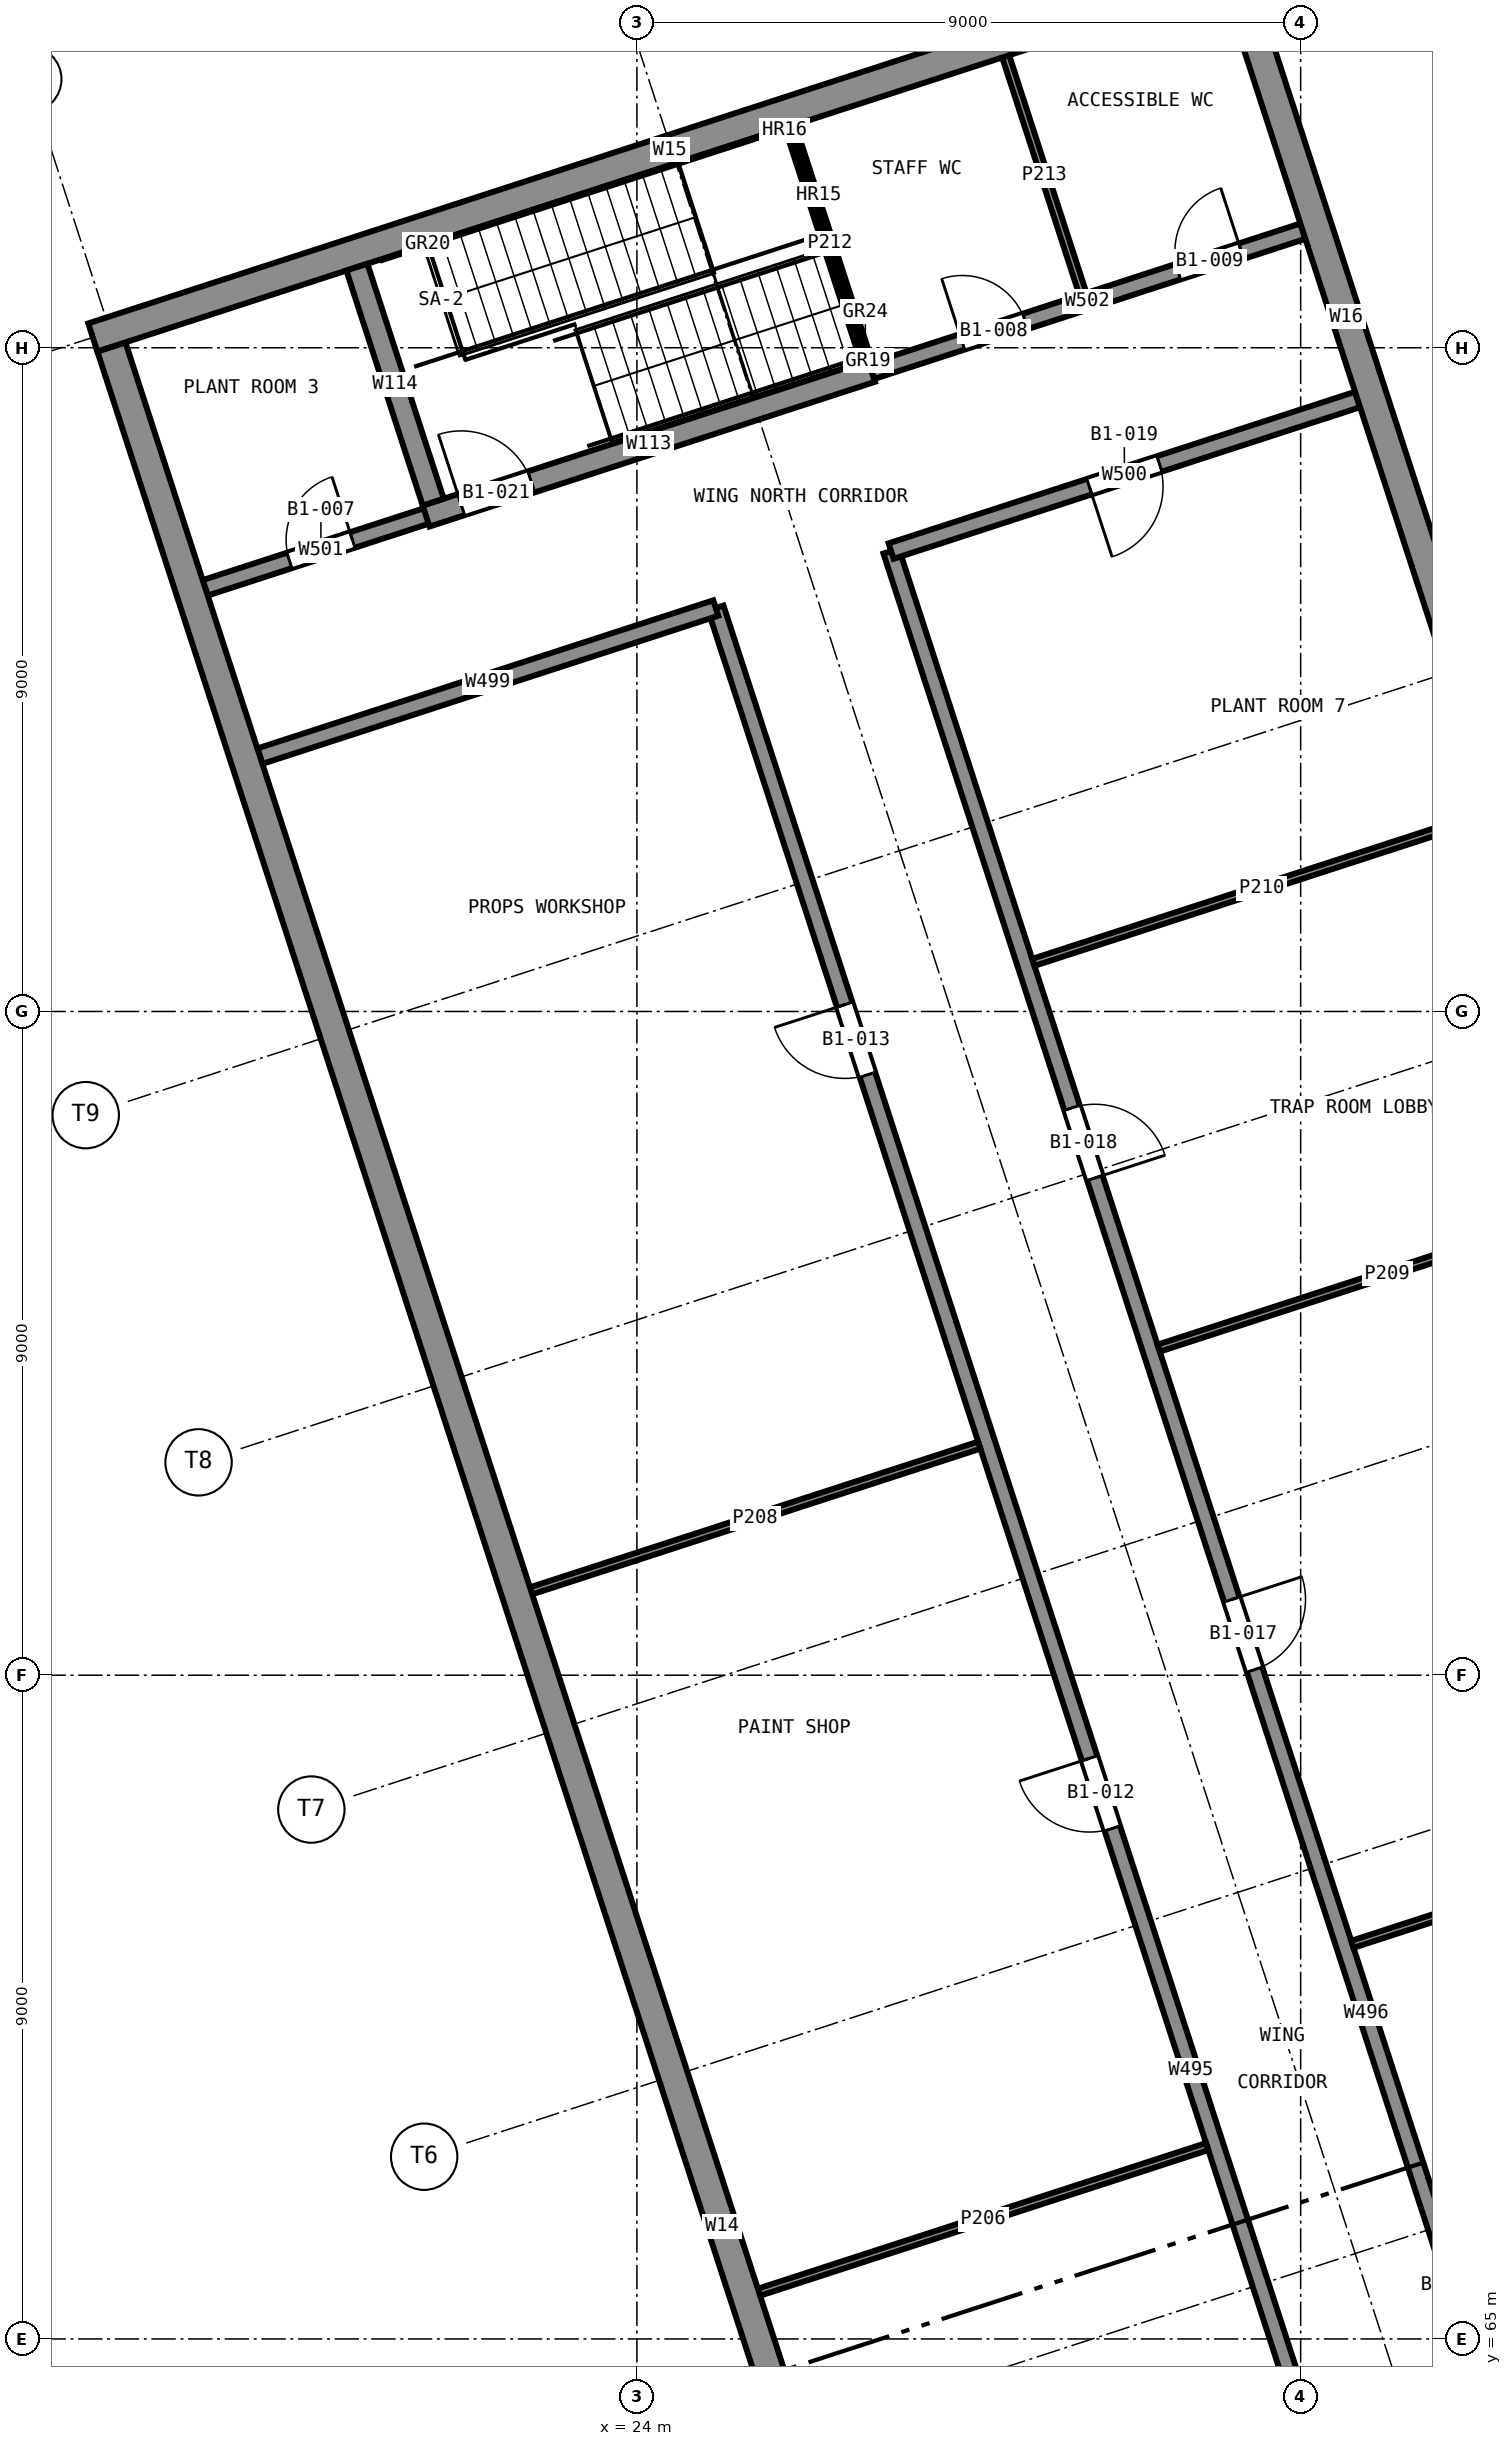
"""IFC4 building model, lengths in metres.
Left out: names, types, materials, properties, quantities, classifications, styles, units other than length and angle.
Written with IfcOpenShell. Run it as: python <this file> out.ifc"""

import sys

from ifc_helpers import new_model, si_unit, direction, frame, frame_2d, origin, place, context, subcontext, project, spatial, rectangle, extrude, element, fill, save


model = new_model("IFC4")
c1 = context("Model", 3, precision=1e-05, world=origin(), true_north=direction((0.0, 1.0)))
c2 = subcontext(c1, "Body", "Model", "MODEL_VIEW")
j1 = project(units=[si_unit("LENGTHUNIT", "METRE"), si_unit("PLANEANGLEUNIT", "RADIAN")], contexts=[c1])
p1 = place(None, origin())
s1 = spatial("IfcSite", under=j1, at=p1, CompositionType="ELEMENT")
p2 = place(p1, origin())
s2 = spatial("IfcBuilding", under=s1, at=p2, CompositionType="ELEMENT")
p3 = place(p2, frame((0.0, 0.0, -5.0)))
s3 = spatial("IfcBuildingStorey", under=s2, at=p3, CompositionType="ELEMENT", Elevation=-5.0)
p4 = place(p3, frame((33.438, 41.035, 0.0), z_axis=(0.0, 0.0, 1.0), x_axis=(-0.309020156104, 0.951055488981, 0.0)))
e1 = element("IfcWall", 1, at=p4, inside=s3, PredefinedType="SOLIDWALL", context=c2, shape_type="SweptSolid", body=[
    extrude(rectangle(XDim=53.6, YDim=0.4, at=frame_2d((26.8, 0.0))), origin(), (0.0, 0.0, 1.0), 5.0),
])
p5 = place(p3, frame((16.622, 92.14, 0.0), z_axis=(0.0, 0.0, 1.0), x_axis=(0.951054352744, 0.30902365302, 0.0)))
e2 = element("IfcWall", 2, at=p5, inside=s3, PredefinedType="SOLIDWALL", context=c2, shape_type="SweptSolid", body=[
    extrude(rectangle(XDim=16.45, YDim=0.4, at=frame_2d((8.225, 0.0))), origin(), (0.0, 0.0, 1.0), 5.0),
])
p6 = place(p3, frame((32.139, 96.971, 0.0), z_axis=(0.0, 0.0, 1.0), x_axis=(0.30901284874, -0.951057863284, 0.0)))
e3 = element("IfcWall", 3, at=p6, inside=s3, PredefinedType="SOLIDWALL", context=c2, shape_type="SweptSolid", body=[
    extrude(rectangle(XDim=9.575, YDim=0.4, at=frame_2d((4.787, 0.0))), origin(), (0.0, 0.0, 1.0), 5.0),
])
p7 = place(p3, frame((27.181, 91.68, 0.0), z_axis=(0.0, 0.0, 1.0), x_axis=(-0.951051301895, -0.309033042189, 0.0)))
e4 = element("IfcWall", 4, at=p7, inside=s3, PredefinedType="SOLIDWALL", context=c2, shape_type="SweptSolid", body=[
    extrude(rectangle(XDim=6.35, YDim=0.3, at=frame_2d((3.175, 0.0))), origin(), (0.0, 0.0, 1.0), 4.6),
])
p8 = place(p7, frame((4.85, 0.0, 0.0)))
e5 = element("IfcOpeningElement", 5, at=p8, cuts=e4, PredefinedType="OPENING", context=c2, shape_type="SweptSolid", body=[
    extrude(rectangle(XDim=1.0, YDim=2.1, at=frame_2d((0.5, 1.05))), frame((0.0, 0.16, 0.0), z_axis=(0.0, -1.0, 0.0), x_axis=(1.0, 0.0, 0.0)), (0.0, 0.0, 1.0), 0.32),
])
p9 = place(p3, frame((21.238, 89.907, 0.0), z_axis=(0.0, 0.0, 1.0), x_axis=(-0.309003676349, 0.951060843481, 0.0)))
e6 = element("IfcWall", 6, at=p9, inside=s3, PredefinedType="SOLIDWALL", context=c2, shape_type="SweptSolid", body=[
    extrude(rectangle(XDim=3.35, YDim=0.3, at=frame_2d((1.675, 0.0))), origin(), (0.0, 0.0, 1.0), 4.6),
])
p10 = place(p3, frame((37.956, 48.812, 0.0), z_axis=(0.0, 0.0, 1.0), x_axis=(-0.30901736393, 0.951056396219, 0.0)))
e7 = element("IfcWall", 7, at=p10, inside=s3, PredefinedType="SOLIDWALL", context=c2, shape_type="SweptSolid", body=[
    extrude(rectangle(XDim=41.7, YDim=0.22, at=frame_2d((20.85, 0.0))), origin(), (0.0, 0.0, 1.0), 4.6),
])
p11 = place(p10, frame((2.009, 0.0, 0.0)))
e8 = element("IfcOpeningElement", 8, at=p11, cuts=e7, PredefinedType="OPENING", context=c2, shape_type="SweptSolid", body=[
    extrude(rectangle(XDim=1.0, YDim=2.1, at=frame_2d((0.5, 1.05))), frame((0.0, 0.12, 0.0), z_axis=(0.0, -1.0, 0.0), x_axis=(1.0, 0.0, 0.0)), (0.0, 0.0, 1.0), 0.24),
])
p12 = place(p10, frame((11.495, 0.0, 0.0)))
e9 = element("IfcOpeningElement", 9, at=p12, cuts=e7, PredefinedType="OPENING", context=c2, shape_type="SweptSolid", body=[
    extrude(rectangle(XDim=1.0, YDim=2.1, at=frame_2d((0.5, 1.05))), frame((0.0, 0.12, 0.0), z_axis=(0.0, -1.0, 0.0), x_axis=(1.0, 0.0, 0.0)), (0.0, 0.0, 1.0), 0.24),
])
p13 = place(p10, frame((24.3, 0.0, 0.0)))
e10 = element("IfcOpeningElement", 10, at=p13, cuts=e7, PredefinedType="OPENING", context=c2, shape_type="SweptSolid", body=[
    extrude(rectangle(XDim=1.0, YDim=2.1, at=frame_2d((0.5, 1.05))), frame((0.0, 0.12, 0.0), z_axis=(0.0, -1.0, 0.0), x_axis=(1.0, 0.0, 0.0)), (0.0, 0.0, 1.0), 0.24),
])
p14 = place(p10, frame((35.045, 0.0, 0.0)))
e11 = element("IfcOpeningElement", 11, at=p14, cuts=e7, PredefinedType="OPENING", context=c2, shape_type="SweptSolid", body=[
    extrude(rectangle(XDim=1.0, YDim=2.1, at=frame_2d((0.5, 1.05))), frame((0.0, 0.12, 0.0), z_axis=(0.0, -1.0, 0.0), x_axis=(1.0, 0.0, 0.0)), (0.0, 0.0, 1.0), 0.24),
])
p15 = place(p3, frame((40.333, 49.584, 0.0), z_axis=(0.0, 0.0, 1.0), x_axis=(-0.309015643281, 0.951056955291, 0.0)))
e12 = element("IfcWall", 12, at=p15, inside=s3, PredefinedType="SOLIDWALL", context=c2, shape_type="SweptSolid", body=[
    extrude(rectangle(XDim=41.7, YDim=0.22, at=frame_2d((20.85, 0.0))), origin(), (0.0, 0.0, 1.0), 4.6),
])
p16 = place(p15, frame((2.0, 0.0, 0.0)))
e13 = element("IfcOpeningElement", 13, at=p16, cuts=e12, PredefinedType="OPENING", context=c2, shape_type="SweptSolid", body=[
    extrude(rectangle(XDim=1.0, YDim=2.1, at=frame_2d((0.5, 1.05))), frame((0.0, 0.12, 0.0), z_axis=(0.0, -1.0, 0.0), x_axis=(1.0, 0.0, 0.0)), (0.0, 0.0, 1.0), 0.24),
])
p17 = place(p15, frame((8.285, 0.0, 0.0)))
e14 = element("IfcOpeningElement", 14, at=p17, cuts=e12, PredefinedType="OPENING", context=c2, shape_type="SweptSolid", body=[
    extrude(rectangle(XDim=1.0, YDim=2.1, at=frame_2d((0.5, 1.05))), frame((0.0, 0.12, 0.0), z_axis=(0.0, -1.0, 0.0), x_axis=(1.0, 0.0, 0.0)), (0.0, 0.0, 1.0), 0.24),
])
p18 = place(p15, frame((16.475, 0.0, 0.0)))
e15 = element("IfcOpeningElement", 15, at=p18, cuts=e12, PredefinedType="OPENING", context=c2, shape_type="SweptSolid", body=[
    extrude(rectangle(XDim=1.0, YDim=2.1, at=frame_2d((0.5, 1.05))), frame((0.0, 0.12, 0.0), z_axis=(0.0, -1.0, 0.0), x_axis=(1.0, 0.0, 0.0)), (0.0, 0.0, 1.0), 0.24),
])
p19 = place(p15, frame((25.752, 0.0, 0.0)))
e16 = element("IfcOpeningElement", 16, at=p19, cuts=e12, PredefinedType="OPENING", context=c2, shape_type="SweptSolid", body=[
    extrude(rectangle(XDim=1.0, YDim=2.1, at=frame_2d((0.5, 1.05))), frame((0.0, 0.12, 0.0), z_axis=(0.0, -1.0, 0.0), x_axis=(1.0, 0.0, 0.0)), (0.0, 0.0, 1.0), 0.24),
])
p20 = place(p15, frame((32.761, 0.0, 0.0)))
e17 = element("IfcOpeningElement", 17, at=p20, cuts=e12, PredefinedType="OPENING", context=c2, shape_type="SweptSolid", body=[
    extrude(rectangle(XDim=1.0, YDim=2.1, at=frame_2d((0.5, 1.05))), frame((0.0, 0.12, 0.0), z_axis=(0.0, -1.0, 0.0), x_axis=(1.0, 0.0, 0.0)), (0.0, 0.0, 1.0), 0.24),
])
p21 = place(p3, frame((18.888, 86.462, 0.0), z_axis=(0.0, 0.0, 1.0), x_axis=(0.951059735424, 0.30900708674, 0.0)))
e18 = element("IfcWall", 18, at=p21, inside=s3, PredefinedType="SOLIDWALL", context=c2, shape_type="SweptSolid", body=[
    extrude(rectangle(XDim=6.5, YDim=0.22, at=frame_2d((3.25, 0.0))), origin(), (0.0, 0.0, 1.0), 4.6),
])
p22 = place(p3, frame((27.447, 89.243, 0.0), z_axis=(0.0, 0.0, 1.0), x_axis=(0.95105699893, 0.309015508975, 0.0)))
e19 = element("IfcWall", 19, at=p22, inside=s3, PredefinedType="SOLIDWALL", context=c2, shape_type="SweptSolid", body=[
    extrude(rectangle(XDim=6.65, YDim=0.22, at=frame_2d((3.325, 0.0))), origin(), (0.0, 0.0, 1.0), 4.6),
])
p23 = place(p22, frame((2.825, 0.0, 0.0)))
e20 = element("IfcOpeningElement", 20, at=p23, cuts=e19, PredefinedType="OPENING", context=c2, shape_type="SweptSolid", body=[
    extrude(rectangle(XDim=1.0, YDim=2.1, at=frame_2d((0.5, 1.05))), frame((0.0, 0.12, 0.0), z_axis=(0.0, -1.0, 0.0), x_axis=(1.0, 0.0, 0.0)), (0.0, 0.0, 1.0), 0.24),
])
p24 = place(p3, frame((18.146, 88.744, 0.0), z_axis=(0.0, 0.0, 1.0), x_axis=(0.951053095941, 0.309027520945, 0.0)))
e21 = element("IfcWall", 21, at=p24, inside=s3, PredefinedType="SOLIDWALL", context=c2, shape_type="SweptSolid", body=[
    extrude(rectangle(XDim=3.3, YDim=0.22, at=frame_2d((1.65, 0.0))), origin(), (0.0, 0.0, 1.0), 4.6),
])
p25 = place(p24, frame((1.2, 0.0, 0.0)))
e22 = element("IfcOpeningElement", 22, at=p25, cuts=e21, PredefinedType="OPENING", context=c2, shape_type="SweptSolid", body=[
    extrude(rectangle(XDim=0.9, YDim=2.1, at=frame_2d((0.45, 1.05))), frame((0.0, 0.12, 0.0), z_axis=(0.0, -1.0, 0.0), x_axis=(1.0, 0.0, 0.0)), (0.0, 0.0, 1.0), 0.24),
])
p26 = place(p3, frame((27.181, 91.68, 0.0), z_axis=(0.0, 0.0, 1.0), x_axis=(0.951061487132, 0.309001695293, 0.0)))
e23 = element("IfcWall", 23, at=p26, inside=s3, PredefinedType="SOLIDWALL", context=c2, shape_type="SweptSolid", body=[
    extrude(rectangle(XDim=6.15, YDim=0.22, at=frame_2d((3.075, 0.0))), origin(), (0.0, 0.0, 1.0), 4.6),
])
p27 = place(p26, frame((1.293, 0.0, 0.0)))
e24 = element("IfcOpeningElement", 24, at=p27, cuts=e23, PredefinedType="OPENING", context=c2, shape_type="SweptSolid", body=[
    extrude(rectangle(XDim=0.9, YDim=2.1, at=frame_2d((0.45, 1.05))), frame((0.0, 0.12, 0.0), z_axis=(0.0, -1.0, 0.0), x_axis=(1.0, 0.0, 0.0)), (0.0, 0.0, 1.0), 0.24),
])
p28 = place(p26, frame((4.371, 0.0, 0.0)))
e25 = element("IfcOpeningElement", 25, at=p28, cuts=e23, PredefinedType="OPENING", context=c2, shape_type="SweptSolid", body=[
    extrude(rectangle(XDim=0.9, YDim=2.1, at=frame_2d((0.45, 1.05))), frame((0.0, 0.12, 0.0), z_axis=(0.0, -1.0, 0.0), x_axis=(1.0, 0.0, 0.0)), (0.0, 0.0, 1.0), 0.24),
])
p29 = place(p3, frame((25.655, 65.634, 0.0), z_axis=(0.0, 0.0, 1.0), x_axis=(0.951055405517, 0.309020412977, 0.0)))
e26 = element("IfcWall", 26, at=p29, inside=s3, PredefinedType="PARTITIONING", context=c2, shape_type="SweptSolid", body=[
    extrude(rectangle(XDim=6.39, YDim=0.1, at=frame_2d((3.195, 0.0))), origin(), (0.0, 0.0, 1.0), 4.6),
])
p30 = place(p3, frame((33.701, 70.351, 0.0), z_axis=(0.0, 0.0, 1.0), x_axis=(0.951058024796, 0.309012351648, 0.0)))
e27 = element("IfcWall", 27, at=p30, inside=s3, PredefinedType="PARTITIONING", context=c2, shape_type="SweptSolid", body=[
    extrude(rectangle(XDim=6.515, YDim=0.1, at=frame_2d((3.257, 0.0))), origin(), (0.0, 0.0, 1.0), 4.6),
])
p31 = place(p3, frame((22.565, 75.144, 0.0), z_axis=(0.0, 0.0, 1.0), x_axis=(0.951055405517, 0.309020412977, 0.0)))
e28 = element("IfcWall", 28, at=p31, inside=s3, PredefinedType="PARTITIONING", context=c2, shape_type="SweptSolid", body=[
    extrude(rectangle(XDim=6.39, YDim=0.1, at=frame_2d((3.195, 0.0))), origin(), (0.0, 0.0, 1.0), 4.6),
])
p32 = place(p3, frame((31.075, 78.435, 0.0), z_axis=(0.0, 0.0, 1.0), x_axis=(0.951058024796, 0.309012351648, 0.0)))
e29 = element("IfcWall", 29, at=p32, inside=s3, PredefinedType="PARTITIONING", context=c2, shape_type="SweptSolid", body=[
    extrude(rectangle(XDim=6.515, YDim=0.1, at=frame_2d((3.257, 0.0))), origin(), (0.0, 0.0, 1.0), 4.6),
])
p33 = place(p3, frame((29.375, 83.666, 0.0), z_axis=(0.0, 0.0, 1.0), x_axis=(0.951061602966, 0.309001338773, 0.0)))
e30 = element("IfcWall", 30, at=p33, inside=s3, PredefinedType="PARTITIONING", context=c2, shape_type="SweptSolid", body=[
    extrude(rectangle(XDim=6.515, YDim=0.1, at=frame_2d((3.258, 0.0))), origin(), (0.0, 0.0, 1.0), 4.6),
])
p34 = place(p3, frame((27.135, 91.823, 0.0), z_axis=(0.0, 0.0, 1.0), x_axis=(-0.309003676349, 0.951060843481, 0.0)))
e31 = element("IfcWall", 31, at=p34, inside=s3, PredefinedType="PARTITIONING", context=c2, shape_type="SweptSolid", body=[
    extrude(rectangle(XDim=3.35, YDim=0.1, at=frame_2d((1.675, 0.0))), origin(), (0.0, 0.0, 1.0), 4.6),
])
p35 = place(p3, frame((30.048, 92.727, 0.0), z_axis=(0.0, 0.0, 1.0), x_axis=(-0.309024191767, 0.951054177691, 0.0)))
e32 = element("IfcWall", 32, at=p35, inside=s3, PredefinedType="PARTITIONING", context=c2, shape_type="SweptSolid", body=[
    extrude(rectangle(XDim=3.39, YDim=0.1, at=frame_2d((1.695, 0.0))), origin(), (0.0, 0.0, 1.0), 4.6),
])
p36 = place(p25, origin())
e33 = element("IfcDoor", 33, at=p36, inside=s3, OperationType="SINGLE_SWING_LEFT", PredefinedType="DOOR", context=c2, shape_type="SweptSolid", body=[
    extrude(rectangle(XDim=0.9, YDim=2.1, at=frame_2d((0.45, 1.05))), frame((0.0, 0.025, 0.0), z_axis=(0.0, -1.0, 0.0), x_axis=(1.0, 0.0, 0.0)), (0.0, 0.0, 1.0), 0.05),
])
fill(e22, e33)
p37 = place(p27, origin())
e34 = element("IfcDoor", 34, at=p37, inside=s3, OperationType="SINGLE_SWING_RIGHT", PredefinedType="DOOR", context=c2, shape_type="SweptSolid", body=[
    extrude(rectangle(XDim=0.9, YDim=2.1, at=frame_2d((0.45, 1.05))), frame((0.0, 0.025, 0.0), z_axis=(0.0, -1.0, 0.0), x_axis=(1.0, 0.0, 0.0)), (0.0, 0.0, 1.0), 0.05),
])
fill(e24, e34)
p38 = place(p28, origin())
e35 = element("IfcDoor", 35, at=p38, inside=s3, OperationType="SINGLE_SWING_LEFT", PredefinedType="DOOR", context=c2, shape_type="SweptSolid", body=[
    extrude(rectangle(XDim=0.9, YDim=2.1, at=frame_2d((0.45, 1.05))), frame((0.0, 0.025, 0.0), z_axis=(0.0, -1.0, 0.0), x_axis=(1.0, 0.0, 0.0)), (0.0, 0.0, 1.0), 0.05),
])
fill(e25, e35)
p39 = place(p13, origin())
e36 = element("IfcDoor", 36, at=p39, inside=s3, OperationType="SINGLE_SWING_LEFT", PredefinedType="DOOR", context=c2, shape_type="SweptSolid", body=[
    extrude(rectangle(XDim=1.0, YDim=2.1, at=frame_2d((0.5, 1.05))), frame((0.0, 0.025, 0.0), z_axis=(0.0, -1.0, 0.0), x_axis=(1.0, 0.0, 0.0)), (0.0, 0.0, 1.0), 0.05),
])
fill(e10, e36)
p40 = place(p14, origin())
e37 = element("IfcDoor", 37, at=p40, inside=s3, OperationType="SINGLE_SWING_LEFT", PredefinedType="DOOR", context=c2, shape_type="SweptSolid", body=[
    extrude(rectangle(XDim=1.0, YDim=2.1, at=frame_2d((0.5, 1.05))), frame((0.0, 0.025, 0.0), z_axis=(0.0, -1.0, 0.0), x_axis=(1.0, 0.0, 0.0)), (0.0, 0.0, 1.0), 0.05),
])
fill(e11, e37)
p41 = place(p19, frame((1.0, 0.0, 0.0), z_axis=(0.0, 0.0, 1.0), x_axis=(-1.0, 0.0, 0.0)))
e38 = element("IfcDoor", 38, at=p41, inside=s3, OperationType="SINGLE_SWING_RIGHT", PredefinedType="DOOR", context=c2, shape_type="SweptSolid", body=[
    extrude(rectangle(XDim=1.0, YDim=2.1, at=frame_2d((0.5, 1.05))), frame((0.0, 0.025, 0.0), z_axis=(0.0, -1.0, 0.0), x_axis=(1.0, 0.0, 0.0)), (0.0, 0.0, 1.0), 0.05),
])
fill(e16, e38)
p42 = place(p20, frame((1.0, 0.0, 0.0), z_axis=(0.0, 0.0, 1.0), x_axis=(-1.0, 0.0, 0.0)))
e39 = element("IfcDoor", 39, at=p42, inside=s3, OperationType="SINGLE_SWING_LEFT", PredefinedType="DOOR", context=c2, shape_type="SweptSolid", body=[
    extrude(rectangle(XDim=1.0, YDim=2.1, at=frame_2d((0.5, 1.05))), frame((0.0, 0.025, 0.0), z_axis=(0.0, -1.0, 0.0), x_axis=(1.0, 0.0, 0.0)), (0.0, 0.0, 1.0), 0.05),
])
fill(e17, e39)
p43 = place(p23, frame((1.0, 0.0, 0.0), z_axis=(0.0, 0.0, 1.0), x_axis=(-1.0, 0.0, 0.0)))
e40 = element("IfcDoor", 40, at=p43, inside=s3, OperationType="SINGLE_SWING_LEFT", PredefinedType="DOOR", context=c2, shape_type="SweptSolid", body=[
    extrude(rectangle(XDim=1.0, YDim=2.1, at=frame_2d((0.5, 1.05))), frame((0.0, 0.025, 0.0), z_axis=(0.0, -1.0, 0.0), x_axis=(1.0, 0.0, 0.0)), (0.0, 0.0, 1.0), 0.05),
])
fill(e20, e40)
p44 = place(p8, frame((1.0, 0.0, 0.0), z_axis=(0.0, 0.0, 1.0), x_axis=(-1.0, 0.0, 0.0)))
e41 = element("IfcDoor", 41, at=p44, inside=s3, OperationType="SINGLE_SWING_RIGHT", PredefinedType="DOOR", context=c2, shape_type="SweptSolid", body=[
    extrude(rectangle(XDim=1.0, YDim=2.1, at=frame_2d((0.5, 1.05))), frame((0.0, 0.025, 0.0), z_axis=(0.0, -1.0, 0.0), x_axis=(1.0, 0.0, 0.0)), (0.0, 0.0, 1.0), 0.05),
])
fill(e5, e41)
save(model, sys.argv[1])
